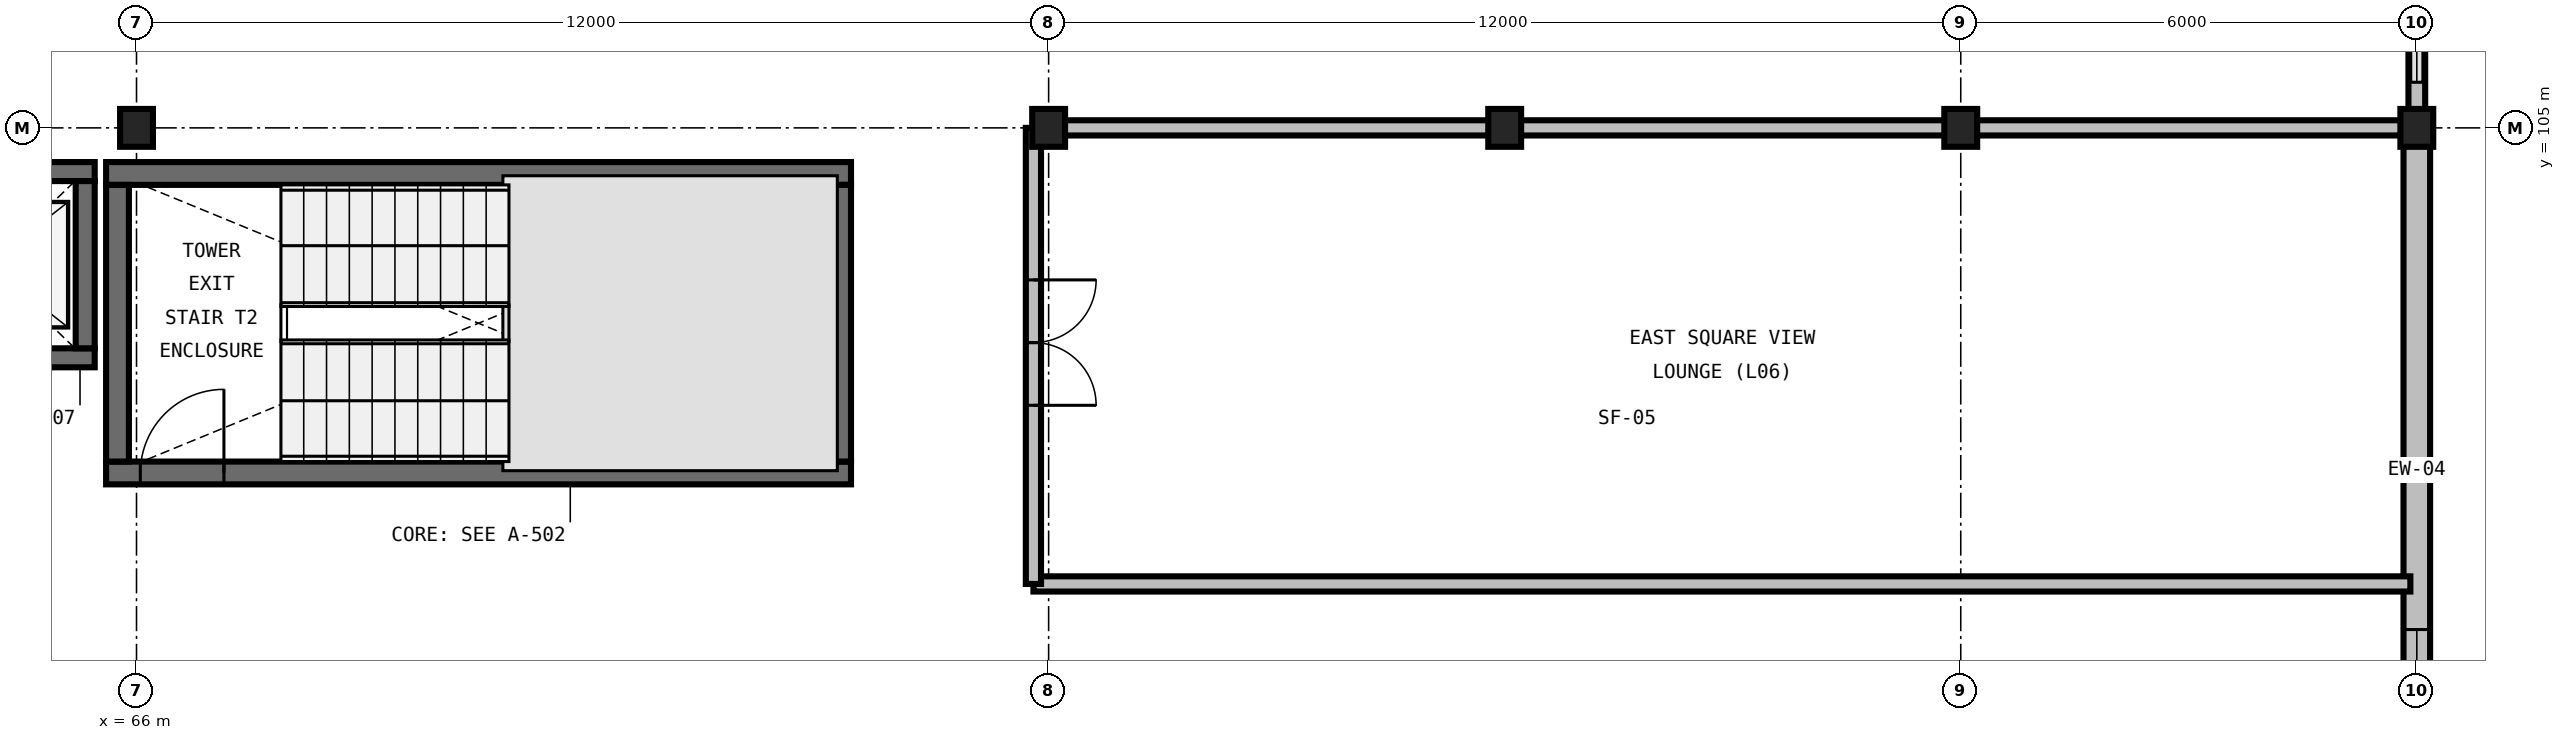
"""IFC4 building model, lengths in metres.
Left out: names, types, materials, properties, quantities, classifications, styles, units other than length and angle.
Written with IfcOpenShell. Run it as: python <this file> out.ifc"""

import sys

from ifc_helpers import new_model, si_unit, direction, frame, frame_2d, origin, origin_2d, place, context, subcontext, project, spatial, rectangle, i_section, extrude, element, fill, save


model = new_model("IFC4")
c1 = context("Model", 3, precision=1e-05, world=origin(), true_north=direction((0.0, 1.0)))
c2 = subcontext(c1, "Body", "Model", "MODEL_VIEW")
j1 = project(units=[si_unit("LENGTHUNIT", "METRE"), si_unit("PLANEANGLEUNIT", "RADIAN")], contexts=[c1])
p1 = place(None, origin())
s1 = spatial("IfcSite", under=j1, at=p1, CompositionType="ELEMENT")
p2 = place(p1, origin())
s2 = spatial("IfcBuilding", under=s1, at=p2, CompositionType="ELEMENT")
p3 = place(p2, frame((0.0, 0.0, 31.2)))
s3 = spatial("IfcBuildingStorey", under=s2, at=p3, CompositionType="ELEMENT", Elevation=31.2)
for number, where, z_axis, x_axis in (
    (1, (66.0, 105.0, 0.0), (0.0, 0.0, 1.0), (1.0, 0.0, 0.0)),
    (2, (78.0, 105.0, 0.0), (0.0, 0.0, 1.0), (1.0, 0.0, 0.0)),
    (3, (84.0, 105.0, 0.0), (0.0, 0.0, 1.0), (1.0, 0.0, 0.0)),
    (4, (90.0, 105.0, 0.0), (0.0, 0.0, 1.0), (1.0, 0.0, 0.0)),
    (5, (96.0, 105.0, 0.0), (0.0, 0.0, 1.0), (1.0, 0.0, 0.0)),
):
    element("IfcColumn", number, at=place(p3, frame(where, z_axis=z_axis, x_axis=x_axis)), inside=s3, PredefinedType="COLUMN", context=c2, shape_type="SweptSolid", body=[
        extrude(i_section(OverallWidth=0.432, OverallDepth=0.498, WebThickness=0.056, FlangeThickness=0.089, FilletRadius=0.031, at=origin_2d()), origin(), (0.0, 0.0, 1.0), 3.6),
    ])
p4 = place(p3, frame((65.6, 100.46, 0.0), z_axis=(0.0, 0.0, 1.0), x_axis=(1.0, 0.0, 0.0)))
e6 = element("IfcWall", 6, at=p4, inside=s3, PredefinedType="SHEAR", context=c2, shape_type="SweptSolid", body=[
    extrude(rectangle(XDim=9.8, YDim=0.3, at=frame_2d((4.9, 0.0))), origin(), (0.0, 0.0, 1.0), 3.6),
])
p5 = place(p4, frame((0.45, 0.0, 0.0)))
e7 = element("IfcOpeningElement", 7, at=p5, cuts=e6, PredefinedType="OPENING", context=c2, shape_type="SweptSolid", body=[
    extrude(rectangle(XDim=1.1, YDim=2.2, at=frame_2d((0.55, 1.1))), frame((0.0, 0.165, 0.0), z_axis=(0.0, -1.0, 0.0), x_axis=(1.0, 0.0, 0.0)), (0.0, 0.0, 1.0), 0.33),
])
p6 = place(p3, frame((75.4, 104.4, 0.0), z_axis=(0.0, 0.0, 1.0), x_axis=(-1.0, 0.0, 0.0)))
e8 = element("IfcWall", 8, at=p6, inside=s3, PredefinedType="SHEAR", context=c2, shape_type="SweptSolid", body=[
    extrude(rectangle(XDim=9.8, YDim=0.3, at=frame_2d((4.9, 0.0))), origin(), (0.0, 0.0, 1.0), 3.6),
])
for number, where, z_axis, x_axis in (
    (9, (65.75, 104.25, 0.0), (0.0, 0.0, 1.0), (0.0, -1.0, 0.0)),
    (10, (75.25, 100.61, 0.0), (0.0, 0.0, 1.0), (0.0, 1.0, 0.0)),
):
    element("IfcWall", number, at=place(p3, frame(where, z_axis=z_axis, x_axis=x_axis)), inside=s3, PredefinedType="SHEAR", context=c2, shape_type="SweptSolid", body=[
        extrude(rectangle(XDim=3.64, YDim=0.3, at=frame_2d((1.82, 0.0))), origin(), (0.0, 0.0, 1.0), 3.6),
    ])
p7 = place(p3, frame((62.65, 101.975, 0.0), z_axis=(0.0, 0.0, 1.0), x_axis=(1.0, 0.0, 0.0)))
e11 = element("IfcWall", 11, at=p7, inside=s3, PredefinedType="SHEAR", context=c2, shape_type="SweptSolid", body=[
    extrude(rectangle(XDim=2.8, YDim=0.25, at=frame_2d((1.4, 0.0))), origin(), (0.0, 0.0, 1.0), 3.6),
])
p8 = place(p7, frame((0.8, 0.0, 0.0)))
e12 = element("IfcOpeningElement", 12, at=p8, cuts=e11, PredefinedType="OPENING", context=c2, shape_type="SweptSolid", body=[
    extrude(rectangle(XDim=1.2, YDim=2.2, at=frame_2d((0.6, 1.1))), frame((0.0, 0.14, 0.0), z_axis=(0.0, -1.0, 0.0), x_axis=(1.0, 0.0, 0.0)), (0.0, 0.0, 1.0), 0.28),
])
p9 = place(p3, frame((65.45, 104.425, 0.0), z_axis=(0.0, 0.0, 1.0), x_axis=(-1.0, 0.0, 0.0)))
e13 = element("IfcWall", 13, at=p9, inside=s3, PredefinedType="SHEAR", context=c2, shape_type="SweptSolid", body=[
    extrude(rectangle(XDim=2.8, YDim=0.25, at=frame_2d((1.4, 0.0))), origin(), (0.0, 0.0, 1.0), 3.6),
])
p10 = place(p3, frame((65.325, 102.1, 0.0), z_axis=(0.0, 0.0, 1.0), x_axis=(0.0, 1.0, 0.0)))
e14 = element("IfcWall", 14, at=p10, inside=s3, PredefinedType="SHEAR", context=c2, shape_type="SweptSolid", body=[
    extrude(rectangle(XDim=2.2, YDim=0.25, at=frame_2d((1.1, 0.0))), origin(), (0.0, 0.0, 1.0), 3.6),
])
p11 = place(p3, frame((96.0, 96.0, 0.0), z_axis=(0.0, 0.0, 1.0), x_axis=(0.0, 1.0, 0.0)))
e15 = element("IfcWall", 15, at=p11, inside=s3, PredefinedType="STANDARD", context=c2, shape_type="SweptSolid", body=[
    extrude(rectangle(XDim=9.0, YDim=0.35, at=frame_2d((4.5, 0.0))), origin(), (0.0, 0.0, 1.0), 2.981),
])
p12 = place(p11, frame((0.6, 0.0, 0.85)))
e16 = element("IfcOpeningElement", 16, at=p12, cuts=e15, PredefinedType="OPENING", context=c2, shape_type="SweptSolid", body=[
    extrude(rectangle(XDim=1.8, YDim=1.5, at=frame_2d((0.9, 0.75))), frame((0.0, 0.19, 0.0), z_axis=(0.0, -1.0, 0.0), x_axis=(1.0, 0.0, 0.0)), (0.0, 0.0, 1.0), 0.38),
])
p13 = place(p3, frame((96.0, 105.0, 0.0), z_axis=(0.0, 0.0, 1.0), x_axis=(0.0, 1.0, 0.0)))
e17 = element("IfcWall", 17, at=p13, inside=s3, PredefinedType="PARAPET", context=c2, shape_type="SweptSolid", body=[
    extrude(rectangle(XDim=12.0, YDim=0.22, at=frame_2d((6.0, 0.0))), origin(), (0.0, 0.0, 1.0), 0.2),
])
p14 = place(p3, frame((77.8, 99.0, 0.0), z_axis=(0.0, 0.0, 1.0), x_axis=(1.0, 0.0, 0.0)))
e18 = element("IfcWall", 18, at=p14, inside=s3, PredefinedType="PARTITIONING", context=c2, shape_type="SweptSolid", body=[
    extrude(rectangle(XDim=18.115, YDim=0.2, at=frame_2d((9.057, 0.0))), origin(), (0.0, 0.0, 1.0), 3.29),
])
p15 = place(p3, frame((95.915, 105.0, 0.0), z_axis=(0.0, 0.0, 1.0), x_axis=(-1.0, 0.0, 0.0)))
e19 = element("IfcWall", 19, at=p15, inside=s3, PredefinedType="PARTITIONING", context=c2, shape_type="SweptSolid", body=[
    extrude(rectangle(XDim=18.115, YDim=0.2, at=frame_2d((9.057, 0.0))), origin(), (0.0, 0.0, 1.0), 2.736),
])
p16 = place(p3, frame((77.8, 105.0, 0.0), z_axis=(0.0, 0.0, 1.0), x_axis=(0.0, -1.0, 0.0)))
e20 = element("IfcWall", 20, at=p16, inside=s3, PredefinedType="PARTITIONING", context=c2, shape_type="SweptSolid", body=[
    extrude(rectangle(XDim=6.0, YDim=0.2, at=frame_2d((3.0, 0.0))), origin(), (0.0, 0.0, 1.0), 3.29),
])
p17 = place(p16, frame((2.0, 0.0, 0.0)))
e21 = element("IfcOpeningElement", 21, at=p17, cuts=e20, PredefinedType="OPENING", context=c2, shape_type="SweptSolid", body=[
    extrude(rectangle(XDim=1.65, YDim=2.25, at=frame_2d((0.825, 1.125))), frame((0.0, 0.115, 0.0), z_axis=(0.0, -1.0, 0.0), x_axis=(1.0, 0.0, 0.0)), (0.0, 0.0, 1.0), 0.23),
])
p18 = place(p5, origin())
e22 = element("IfcDoor", 22, at=p18, inside=s3, OperationType="SINGLE_SWING_RIGHT", PredefinedType="DOOR", context=c2, shape_type="SweptSolid", body=[
    extrude(rectangle(XDim=1.1, YDim=2.2, at=frame_2d((0.55, 1.1))), frame((0.0, 0.025, 0.0), z_axis=(0.0, -1.0, 0.0), x_axis=(1.0, 0.0, 0.0)), (0.0, 0.0, 1.0), 0.05),
])
fill(e7, e22)
p19 = place(p12, origin())
e23 = element("IfcWindow", 23, at=p19, inside=s3, PartitioningType="SINGLE_PANEL", PredefinedType="WINDOW", context=c2, shape_type="SweptSolid", body=[
    extrude(rectangle(XDim=1.8, YDim=1.5, at=frame_2d((0.9, 0.75))), frame((0.0, 0.03, 0.0), z_axis=(0.0, -1.0, 0.0), x_axis=(1.0, 0.0, 0.0)), (0.0, 0.0, 1.0), 0.06),
])
fill(e16, e23)
p20 = place(p17, origin())
e24 = element("IfcDoor", 24, at=p20, inside=s3, OperationType="DOUBLE_DOOR_SINGLE_SWING", PredefinedType="DOOR", context=c2, shape_type="SweptSolid", body=[
    extrude(rectangle(XDim=1.65, YDim=2.25, at=frame_2d((0.825, 1.125))), frame((0.0, 0.025, 0.0), z_axis=(0.0, -1.0, 0.0), x_axis=(1.0, 0.0, 0.0)), (0.0, 0.0, 1.0), 0.05),
])
fill(e21, e24)
save(model, sys.argv[1])
